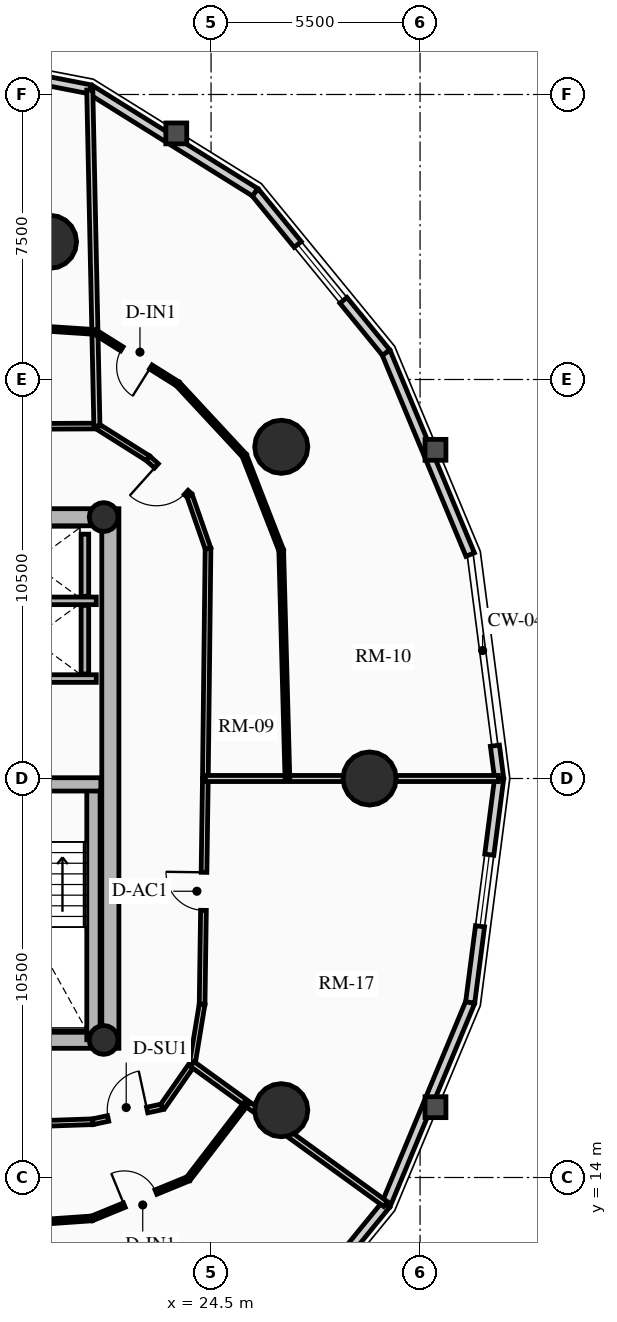
"""IFC4 building model, lengths in metres.
Left out: names, types, materials, properties, quantities, classifications, styles, units other than length and angle.
Written with IfcOpenShell. Run it as: python <this file> out.ifc"""

import sys

from ifc_helpers import new_model, si_unit, direction, frame, frame_2d, origin, origin_2d, place, context, subcontext, project, spatial, rectangle, circle, hollow_circle, extrude, source, transform, mapped, element, fill, save


model = new_model("IFC4")
c1 = context("Model", 3, precision=1e-05, world=origin(), true_north=direction((0.0, 1.0)))
c2 = subcontext(c1, "Body", "Model", "MODEL_VIEW")
j1 = project(units=[si_unit("LENGTHUNIT", "METRE"), si_unit("PLANEANGLEUNIT", "RADIAN")], contexts=[c1])
p1 = place(None, origin())
s1 = spatial("IfcSite", under=j1, at=p1, CompositionType="ELEMENT")
p2 = place(p1, origin())
s2 = spatial("IfcBuilding", under=s1, at=p2, CompositionType="ELEMENT")
p3 = place(p2, frame((0.0, 0.0, 87.61)))
s3 = spatial("IfcBuildingStorey", under=s2, at=p3, CompositionType="ELEMENT", Elevation=87.61)
p4 = place(p3, frame((21.85, 17.4, 0.0), z_axis=(0.0, 0.0, 1.0), x_axis=(0.0, 1.0, 0.0)))
e1 = element("IfcWall", 1, at=p4, inside=s3, PredefinedType="SHEAR", context=c2, shape_type="SweptSolid", body=[
    extrude(rectangle(XDim=14.2, YDim=0.45, at=frame_2d((7.1, 0.0))), origin(), (0.0, 0.0, 1.0), 2.91),
])
p5 = place(p3, frame((11.15, 17.625, 0.0), z_axis=(0.0, 0.0, 1.0), x_axis=(1.0, 0.0, 0.0)))
e2 = element("IfcWall", 2, at=p5, inside=s3, PredefinedType="SHEAR", context=c2, shape_type="SweptSolid", body=[
    extrude(rectangle(XDim=10.7, YDim=0.45, at=frame_2d((5.35, 0.0))), origin(), (0.0, 0.0, 1.0), 2.91),
])
m1 = source(origin(), c2, "Body", "SweptSolid", [
    extrude(rectangle(XDim=1.5, YDim=2.02, at=frame_2d((0.75, 1.01))), frame((0.0, 0.235, 0.0), z_axis=(0.0, -1.0, 0.0), x_axis=(1.0, 0.0, 0.0)), (0.0, 0.0, 1.0), 0.47),
])
p6 = place(p5, frame((5.45, 0.0, 0.0)))
e3 = element("IfcOpeningElement", 3, at=p6, cuts=e2, PredefinedType="OPENING", context=c2, shape_type="MappedRepresentation", body=[
    mapped(m1, transform((0.0, 0.0, 0.0), x_axis=(1.0, 0.0, 0.0), y_axis=(0.0, 1.0, 0.0), z_axis=(0.0, 0.0, 1.0), scale=1.0)),
])
p7 = place(p3, frame((11.15, 31.375, 0.0), z_axis=(0.0, 0.0, 1.0), x_axis=(1.0, 0.0, 0.0)))
e4 = element("IfcWall", 4, at=p7, inside=s3, PredefinedType="SHEAR", context=c2, shape_type="SweptSolid", body=[
    extrude(rectangle(XDim=10.7, YDim=0.45, at=frame_2d((5.35, 0.0))), origin(), (0.0, 0.0, 1.0), 2.91),
])
p8 = place(p7, frame((4.6, 0.0, 0.0)))
e5 = element("IfcOpeningElement", 5, at=p8, cuts=e4, PredefinedType="OPENING", context=c2, shape_type="MappedRepresentation", body=[
    mapped(m1, transform((0.0, 0.0, 0.0), x_axis=(1.0, 0.0, 0.0), y_axis=(0.0, 1.0, 0.0), z_axis=(0.0, 0.0, 1.0), scale=1.0)),
])
p9 = place(p3, frame((21.405, 17.625, 0.0), z_axis=(0.0, 0.0, 1.0), x_axis=(0.0, 1.0, 0.0)))
e6 = element("IfcWall", 6, at=p9, inside=s3, PredefinedType="SHEAR", context=c2, shape_type="SweptSolid", body=[
    extrude(rectangle(XDim=6.72, YDim=0.35, at=frame_2d((3.36, 0.0))), origin(), (0.0, 0.0, 1.0), 2.91),
])
p10 = place(p3, frame((18.315, 24.345, 0.0), z_axis=(0.0, 0.0, 1.0), x_axis=(1.0, 0.0, 0.0)))
e7 = element("IfcWall", 7, at=p10, inside=s3, PredefinedType="SHEAR", context=c2, shape_type="SweptSolid", body=[
    extrude(rectangle(XDim=3.285, YDim=0.35, at=frame_2d((1.643, 0.0))), origin(), (0.0, 0.0, 1.0), 2.91),
])
for number, where, z_axis, x_axis in (
    (8, (21.675, 17.62, 0.0), (0.0, 0.0, 1.0), (1.0, 0.0, 0.0)),
    (9, (21.675, 31.38, 0.0), (0.0, 0.0, 1.0), (1.0, 0.0, 0.0)),
):
    element("IfcColumn", number, at=place(p3, frame(where, z_axis=z_axis, x_axis=x_axis)), inside=s3, PredefinedType="COLUMN", context=c2, shape_type="SweptSolid", body=[
        extrude(hollow_circle(Radius=0.38, WallThickness=0.032, at=origin_2d()), origin(), (0.0, 0.0, 1.0), 2.91),
    ])
for number, where, z_axis, x_axis in (
    (10, (28.672, 24.5, 0.0), (0.0, 0.0, 1.0), (1.0, 0.0, 0.0)),
    (11, (26.347, 33.229, 0.0), (0.0, 0.0, 1.0), (1.0, 0.0, 0.0)),
    (12, (20.261, 38.623, 0.0), (0.0, 0.0, 1.0), (1.0, 0.0, 0.0)),
    (13, (26.347, 15.771, 0.0), (0.0, 0.0, 1.0), (1.0, 0.0, 0.0)),
):
    element("IfcColumn", number, at=place(p3, frame(where, z_axis=z_axis, x_axis=x_axis)), inside=s3, PredefinedType="USERDEFINED", context=c2, shape_type="SweptSolid", body=[
        extrude(circle(Radius=0.7, at=origin_2d()), origin(), (0.0, 0.0, 1.0), 2.91),
    ])
p11 = place(p3, frame((31.969, 25.363, 0.0), z_axis=(0.0, 0.0, 1.0), x_axis=(0.128523364007, -0.991706481225, 0.0)))
e14 = element("IfcWall", 14, at=p11, inside=s3, PredefinedType="SOLIDWALL", context=c2, shape_type="SweptSolid", body=[
    extrude(rectangle(XDim=0.87, YDim=0.24, at=frame_2d((0.435, 0.0))), origin(), (0.0, 0.0, 1.0), 2.655),
])
p12 = place(p3, frame((29.105, 35.709, 0.0), z_axis=(0.0, 0.0, 1.0), x_axis=(0.384344417632, -0.923189779317, 0.0)))
e15 = element("IfcWall", 15, at=p12, inside=s3, PredefinedType="SOLIDWALL", context=c2, shape_type="SweptSolid", body=[
    extrude(rectangle(XDim=5.758, YDim=0.24, at=frame_2d((2.879, 0.0))), origin(), (0.0, 0.0, 1.0), 2.179),
])
p13 = place(p3, frame((25.658, 39.928, 0.0), z_axis=(0.0, 0.0, 1.0), x_axis=(0.632700781152, -0.77439635945, 0.0)))
e16 = element("IfcWall", 16, at=p13, inside=s3, PredefinedType="SOLIDWALL", context=c2, shape_type="SweptSolid", body=[
    extrude(rectangle(XDim=5.448, YDim=0.24, at=frame_2d((2.724, 0.0))), origin(), (0.0, 0.0, 1.0), 2.179),
])
m2 = source(origin(), c2, "Body", "SweptSolid", [
    extrude(rectangle(XDim=1.9, YDim=1.35, at=frame_2d((0.95, 0.675))), frame((0.0, 0.13, 0.0), z_axis=(0.0, -1.0, 0.0), x_axis=(1.0, 0.0, 0.0)), (0.0, 0.0, 1.0), 0.26),
])
p14 = place(p13, frame((1.774, 0.0, 0.65)))
e17 = element("IfcOpeningElement", 17, at=p14, cuts=e16, PredefinedType="OPENING", context=c2, shape_type="MappedRepresentation", body=[
    mapped(m2, transform((0.0, 0.0, 0.0), x_axis=(1.0, 0.0, 0.0), y_axis=(0.0, 1.0, 0.0), z_axis=(0.0, 0.0, 1.0), scale=1.0)),
])
p15 = place(p3, frame((21.315, 42.637, 0.0), z_axis=(0.0, 0.0, 1.0), x_axis=(0.848520380187, -0.529162701263, 0.0)))
e18 = element("IfcWall", 18, at=p15, inside=s3, PredefinedType="SOLIDWALL", context=c2, shape_type="SweptSolid", body=[
    extrude(rectangle(XDim=5.119, YDim=0.24, at=frame_2d((2.56, 0.0))), origin(), (0.0, 0.0, 1.0), 2.179),
])
p16 = place(p3, frame((16.5, 43.57, 0.0), z_axis=(0.0, 0.0, 1.0), x_axis=(0.981723785992, -0.190311344954, 0.0)))
e19 = element("IfcWall", 19, at=p16, inside=s3, PredefinedType="SOLIDWALL", context=c2, shape_type="SweptSolid", body=[
    extrude(rectangle(XDim=4.904, YDim=0.24, at=frame_2d((2.452, 0.0))), origin(), (0.0, 0.0, 1.0), 2.179),
])
p17 = place(p16, frame((1.502, 0.0, 0.65)))
e20 = element("IfcOpeningElement", 20, at=p17, cuts=e19, PredefinedType="OPENING", context=c2, shape_type="MappedRepresentation", body=[
    mapped(m2, transform((0.0, 0.0, 0.0), x_axis=(1.0, 0.0, 0.0), y_axis=(0.0, 1.0, 0.0), z_axis=(0.0, 0.0, 1.0), scale=1.0)),
])
p18 = place(p3, frame((29.105, 13.291, 0.0), z_axis=(0.0, 0.0, 1.0), x_axis=(-0.632700781152, -0.77439635945, 0.0)))
e21 = element("IfcWall", 21, at=p18, inside=s3, PredefinedType="SOLIDWALL", context=c2, shape_type="SweptSolid", body=[
    extrude(rectangle(XDim=5.448, YDim=0.24, at=frame_2d((2.724, 0.0))), origin(), (0.0, 0.0, 1.0), 2.179),
])
p19 = place(p18, frame((1.774, 0.0, 0.65)))
e22 = element("IfcOpeningElement", 22, at=p19, cuts=e21, PredefinedType="OPENING", context=c2, shape_type="MappedRepresentation", body=[
    mapped(m2, transform((0.0, 0.0, 0.0), x_axis=(1.0, 0.0, 0.0), y_axis=(0.0, 1.0, 0.0), z_axis=(0.0, 0.0, 1.0), scale=1.0)),
])
p20 = place(p3, frame((31.318, 18.607, 0.0), z_axis=(0.0, 0.0, 1.0), x_axis=(-0.384344417632, -0.923189779317, 0.0)))
e23 = element("IfcWall", 23, at=p20, inside=s3, PredefinedType="SOLIDWALL", context=c2, shape_type="SweptSolid", body=[
    extrude(rectangle(XDim=5.758, YDim=0.24, at=frame_2d((2.879, 0.0))), origin(), (0.0, 0.0, 1.0), 2.179),
])
p21 = place(p3, frame((32.081, 24.5, 0.0), z_axis=(0.0, 0.0, 1.0), x_axis=(-0.128351991996, -0.991728675672, 0.0)))
e24 = element("IfcWall", 24, at=p21, inside=s3, PredefinedType="SOLIDWALL", context=c2, shape_type="SweptSolid", body=[
    extrude(rectangle(XDim=5.942, YDim=0.24, at=frame_2d((2.971, 0.0))), origin(), (0.0, 0.0, 1.0), 2.179),
])
p22 = place(p21, frame((2.021, 0.0, 0.65)))
e25 = element("IfcOpeningElement", 25, at=p22, cuts=e24, PredefinedType="OPENING", context=c2, shape_type="MappedRepresentation", body=[
    mapped(m2, transform((0.0, 0.0, 0.0), x_axis=(1.0, 0.0, 0.0), y_axis=(0.0, 1.0, 0.0), z_axis=(0.0, 0.0, 1.0), scale=1.0)),
])
for number, where, z_axis, x_axis in (
    (26, (18.51, 27.13, 0.0), (0.0, 0.0, 1.0), (1.0, 0.0, 0.0)),
    (27, (18.51, 29.175, 0.0), (0.0, 0.0, 1.0), (1.0, 0.0, 0.0)),
):
    element("IfcWall", number, at=place(p3, frame(where, z_axis=z_axis, x_axis=x_axis)), inside=s3, PredefinedType="SHEAR", context=c2, shape_type="SweptSolid", body=[
        extrude(rectangle(XDim=2.97, YDim=0.2, at=frame_2d((1.485, 0.0))), origin(), (0.0, 0.0, 1.0), 2.91),
    ])
p23 = place(p3, frame((21.18, 27.25, 0.0), z_axis=(0.0, 0.0, 1.0), x_axis=(0.0, 1.0, 0.0)))
e28 = element("IfcWall", 28, at=p23, inside=s3, PredefinedType="SHEAR", context=c2, shape_type="SweptSolid", body=[
    extrude(rectangle(XDim=1.805, YDim=0.2, at=frame_2d((0.902, 0.0))), origin(), (0.0, 0.0, 1.0), 2.91),
])
p24 = place(p3, frame((21.18, 29.295, 0.0), z_axis=(0.0, 0.0, 1.0), x_axis=(0.0, 1.0, 0.0)))
e29 = element("IfcWall", 29, at=p24, inside=s3, PredefinedType="SHEAR", context=c2, shape_type="SweptSolid", body=[
    extrude(rectangle(XDim=1.635, YDim=0.2, at=frame_2d((0.817, 0.0))), origin(), (0.0, 0.0, 1.0), 2.91),
])
p25 = place(p3, frame((24.35, 24.5, 0.0), z_axis=(0.0, 0.0, 1.0), x_axis=(0.011582078845, 0.999932925475, 0.0)))
e30 = element("IfcWall", 30, at=p25, inside=s3, PredefinedType="PARTITIONING", context=c2, shape_type="SweptSolid", body=[
    extrude(rectangle(XDim=6.05, YDim=0.15, at=frame_2d((3.025, 0.0))), origin(), (0.0, 0.0, 1.0), 2.225),
])
p26 = place(p3, frame((24.42, 30.549, 0.0), z_axis=(0.0, 0.0, 1.0), x_axis=(-0.329071042252, 0.944305167386, 0.0)))
e31 = element("IfcWall", 31, at=p26, inside=s3, PredefinedType="PARTITIONING", context=c2, shape_type="SweptSolid", body=[
    extrude(rectangle(XDim=1.479, YDim=0.15, at=frame_2d((0.74, 0.0))), origin(), (0.0, 0.0, 1.0), 2.225),
])
p27 = place(p3, frame((23.933, 31.946, 0.0), z_axis=(0.0, 0.0, 1.0), x_axis=(-0.744529651383, 0.667589393423, 0.0)))
e32 = element("IfcWall", 32, at=p27, inside=s3, PredefinedType="PARTITIONING", context=c2, shape_type="SweptSolid", body=[
    extrude(rectangle(XDim=1.472, YDim=0.15, at=frame_2d((0.736, 0.0))), origin(), (0.0, 0.0, 1.0), 2.225),
])
m3 = source(origin(), c2, "Body", "SweptSolid", [
    extrude(rectangle(XDim=1.05, YDim=2.015, at=frame_2d((0.525, 1.007))), frame((0.0, 0.085, 0.0), z_axis=(0.0, -1.0, 0.0), x_axis=(1.0, 0.0, 0.0)), (0.0, 0.0, 1.0), 0.17),
])
p28 = place(p27, frame((0.12, 0.0, 0.0)))
e33 = element("IfcOpeningElement", 33, at=p28, cuts=e32, PredefinedType="OPENING", context=c2, shape_type="MappedRepresentation", body=[
    mapped(m3, transform((0.0, 0.0, 0.0), x_axis=(1.0, 0.0, 0.0), y_axis=(0.0, 1.0, 0.0), z_axis=(0.0, 0.0, 1.0), scale=1.0)),
])
p29 = place(p3, frame((22.837, 32.929, 0.0), z_axis=(0.0, 0.0, 1.0), x_axis=(-0.84581079329, 0.533482991252, 0.0)))
e34 = element("IfcWall", 34, at=p29, inside=s3, PredefinedType="PARTITIONING", context=c2, shape_type="SweptSolid", body=[
    extrude(rectangle(XDim=1.585, YDim=0.15, at=frame_2d((0.792, 0.0))), origin(), (0.0, 0.0, 1.0), 2.225),
])
p30 = place(p3, frame((21.496, 33.775, 0.0), z_axis=(0.0, 0.0, 1.0), x_axis=(-0.999989544737, -0.004572790979, 0.0)))
e35 = element("IfcWall", 35, at=p30, inside=s3, PredefinedType="PARTITIONING", context=c2, shape_type="SweptSolid", body=[
    extrude(rectangle(XDim=3.364, YDim=0.15, at=frame_2d((1.682, 0.0))), origin(), (0.0, 0.0, 1.0), 2.225),
])
p31 = place(p3, frame((14.792, 15.24, 0.0), z_axis=(0.0, 0.0, 1.0), x_axis=(0.999408106202, 0.034401122909, 0.0)))
e36 = element("IfcWall", 36, at=p31, inside=s3, PredefinedType="PARTITIONING", context=c2, shape_type="SweptSolid", body=[
    extrude(rectangle(XDim=6.6, YDim=0.15, at=frame_2d((3.3, 0.0))), origin(), (0.0, 0.0, 1.0), 2.225),
])
p32 = place(p3, frame((21.388, 15.468, 0.0), z_axis=(0.0, 0.0, 1.0), x_axis=(0.977672748596, 0.210133283069, 0.0)))
e37 = element("IfcWall", 37, at=p32, inside=s3, PredefinedType="PARTITIONING", context=c2, shape_type="SweptSolid", body=[
    extrude(rectangle(XDim=1.876, YDim=0.15, at=frame_2d((0.938, 0.0))), origin(), (0.0, 0.0, 1.0), 2.225),
])
p33 = place(p32, frame((0.413, 0.0, 0.0)))
e38 = element("IfcOpeningElement", 38, at=p33, cuts=e37, PredefinedType="OPENING", context=c2, shape_type="MappedRepresentation", body=[
    mapped(m3, transform((0.0, 0.0, 0.0), x_axis=(1.0, 0.0, 0.0), y_axis=(0.0, 1.0, 0.0), z_axis=(0.0, 0.0, 1.0), scale=1.0)),
])
p34 = place(p3, frame((23.222, 15.862, 0.0), z_axis=(0.0, 0.0, 1.0), x_axis=(0.571941738195, 0.820294244836, 0.0)))
e39 = element("IfcWall", 39, at=p34, inside=s3, PredefinedType="PARTITIONING", context=c2, shape_type="SweptSolid", body=[
    extrude(rectangle(XDim=1.369, YDim=0.15, at=frame_2d((0.685, 0.0))), origin(), (0.0, 0.0, 1.0), 2.225),
])
p35 = place(p3, frame((24.006, 16.985, 0.0), z_axis=(0.0, 0.0, 1.0), x_axis=(0.162043475877, 0.986783619608, 0.0)))
e40 = element("IfcWall", 40, at=p35, inside=s3, PredefinedType="PARTITIONING", context=c2, shape_type="SweptSolid", body=[
    extrude(rectangle(XDim=1.597, YDim=0.15, at=frame_2d((0.798, 0.0))), origin(), (0.0, 0.0, 1.0), 2.225),
])
p36 = place(p3, frame((24.264, 18.561, 0.0), z_axis=(0.0, 0.0, 1.0), x_axis=(0.014427504204, 0.999895918145, 0.0)))
e41 = element("IfcWall", 41, at=p36, inside=s3, PredefinedType="PARTITIONING", context=c2, shape_type="SweptSolid", body=[
    extrude(rectangle(XDim=5.94, YDim=0.15, at=frame_2d((2.97, 0.0))), origin(), (0.0, 0.0, 1.0), 2.655),
])
m4 = source(origin(), c2, "Body", "SweptSolid", [
    extrude(rectangle(XDim=1.0, YDim=2.015, at=frame_2d((0.5, 1.007))), frame((0.0, 0.085, 0.0), z_axis=(0.0, -1.0, 0.0), x_axis=(1.0, 0.0, 0.0)), (0.0, 0.0, 1.0), 0.17),
])
p37 = place(p36, frame((2.47, 0.0, 0.0)))
e42 = element("IfcOpeningElement", 42, at=p37, cuts=e41, PredefinedType="OPENING", context=c2, shape_type="MappedRepresentation", body=[
    mapped(m4, transform((0.0, 0.0, 0.0), x_axis=(1.0, 0.0, 0.0), y_axis=(0.0, 1.0, 0.0), z_axis=(0.0, 0.0, 1.0), scale=1.0)),
])
p38 = place(p3, frame((24.35, 24.5, 0.0), z_axis=(0.0, 0.0, 1.0), x_axis=(1.0, 0.0, 0.0)))
e43 = element("IfcWall", 43, at=p38, inside=s3, PredefinedType="PARTITIONING", context=c2, shape_type="SweptSolid", body=[
    extrude(rectangle(XDim=7.711, YDim=0.16, at=frame_2d((3.855, 0.0))), origin(), (0.0, 0.0, 1.0), 2.179),
])
p39 = place(p3, frame((21.496, 33.775, 0.0), z_axis=(0.0, 0.0, 1.0), x_axis=(-0.021226580265, 0.999774690763, 0.0)))
e44 = element("IfcWall", 44, at=p39, inside=s3, PredefinedType="PARTITIONING", context=c2, shape_type="SweptSolid", body=[
    extrude(rectangle(XDim=8.845, YDim=0.16, at=frame_2d((4.422, 0.0))), origin(), (0.0, 0.0, 1.0), 2.179),
])
p40 = place(p3, frame((24.006, 16.985, 0.0), z_axis=(0.0, 0.0, 1.0), x_axis=(0.809849730791, -0.586637378231, 0.0)))
e45 = element("IfcWall", 45, at=p40, inside=s3, PredefinedType="PARTITIONING", context=c2, shape_type="SweptSolid", body=[
    extrude(rectangle(XDim=6.277, YDim=0.16, at=frame_2d((3.139, 0.0))), origin(), (0.0, 0.0, 1.0), 2.179),
])
p41 = place(p3, frame((26.509, 24.5, 0.0), z_axis=(0.0, 0.0, 1.0), x_axis=(-0.027112670792, 0.99963238397, 0.0)))
e46 = element("IfcWall", 46, at=p41, inside=s3, PredefinedType="PARTITIONING", context=c2, shape_type="SweptSolid", body=[
    extrude(rectangle(XDim=6.006, YDim=0.125, at=frame_2d((3.003, 0.0))), origin(), (0.0, 0.0, 1.0), 2.225),
])
p42 = place(p3, frame((26.346, 30.504, 0.0), z_axis=(0.0, 0.0, 1.0), x_axis=(-0.362402208915, 0.932021801769, 0.0)))
e47 = element("IfcWall", 47, at=p42, inside=s3, PredefinedType="PARTITIONING", context=c2, shape_type="SweptSolid", body=[
    extrude(rectangle(XDim=2.675, YDim=0.125, at=frame_2d((1.337, 0.0))), origin(), (0.0, 0.0, 1.0), 2.225),
])
p43 = place(p3, frame((25.377, 32.997, 0.0), z_axis=(0.0, 0.0, 1.0), x_axis=(-0.680516524321, 0.732732734445, 0.0)))
e48 = element("IfcWall", 48, at=p43, inside=s3, PredefinedType="PARTITIONING", context=c2, shape_type="SweptSolid", body=[
    extrude(rectangle(XDim=2.576, YDim=0.125, at=frame_2d((1.288, 0.0))), origin(), (0.0, 0.0, 1.0), 2.655),
])
p44 = place(p3, frame((23.624, 34.884, 0.0), z_axis=(0.0, 0.0, 1.0), x_axis=(-0.84728326465, 0.531141289531, 0.0)))
e49 = element("IfcWall", 49, at=p44, inside=s3, PredefinedType="PARTITIONING", context=c2, shape_type="SweptSolid", body=[
    extrude(rectangle(XDim=2.573, YDim=0.125, at=frame_2d((1.287, 0.0))), origin(), (0.0, 0.0, 1.0), 2.225),
])
m5 = source(origin(), c2, "Body", "SweptSolid", [
    extrude(rectangle(XDim=0.9, YDim=2.005, at=frame_2d((0.45, 1.002))), frame((0.0, 0.073, 0.0), z_axis=(0.0, -1.0, 0.0), x_axis=(1.0, 0.0, 0.0)), (0.0, 0.0, 1.0), 0.145),
])
p45 = place(p44, frame((0.836, 0.0, 0.0)))
e50 = element("IfcOpeningElement", 50, at=p45, cuts=e49, PredefinedType="OPENING", context=c2, shape_type="MappedRepresentation", body=[
    mapped(m5, transform((0.0, 0.0, 0.0), x_axis=(1.0, 0.0, 0.0), y_axis=(0.0, 1.0, 0.0), z_axis=(0.0, 0.0, 1.0), scale=1.0)),
])
p46 = place(p3, frame((21.444, 36.251, 0.0), z_axis=(0.0, 0.0, 1.0), x_axis=(-0.997810544349, 0.066137112017, 0.0)))
e51 = element("IfcWall", 51, at=p46, inside=s3, PredefinedType="PARTITIONING", context=c2, shape_type="SweptSolid", body=[
    extrude(rectangle(XDim=3.776, YDim=0.125, at=frame_2d((1.888, 0.0))), origin(), (0.0, 0.0, 1.0), 2.225),
])
p47 = place(p3, frame((15.27, 12.499, 0.0), z_axis=(0.0, 0.0, 1.0), x_axis=(0.997586055533, 0.069441067147, 0.0)))
e52 = element("IfcWall", 52, at=p47, inside=s3, PredefinedType="PARTITIONING", context=c2, shape_type="SweptSolid", body=[
    extrude(rectangle(XDim=6.11, YDim=0.125, at=frame_2d((3.055, 0.0))), origin(), (0.0, 0.0, 1.0), 2.225),
])
p48 = place(p3, frame((21.366, 12.924, 0.0), z_axis=(0.0, 0.0, 1.0), x_axis=(0.924996898971, 0.379974652962, 0.0)))
e53 = element("IfcWall", 53, at=p48, inside=s3, PredefinedType="PARTITIONING", context=c2, shape_type="SweptSolid", body=[
    extrude(rectangle(XDim=2.741, YDim=0.125, at=frame_2d((1.371, 0.0))), origin(), (0.0, 0.0, 1.0), 2.225),
])
p49 = place(p48, frame((0.92, 0.0, 0.0)))
e54 = element("IfcOpeningElement", 54, at=p49, cuts=e53, PredefinedType="OPENING", context=c2, shape_type="MappedRepresentation", body=[
    mapped(m5, transform((0.0, 0.0, 0.0), x_axis=(1.0, 0.0, 0.0), y_axis=(0.0, 1.0, 0.0), z_axis=(0.0, 0.0, 1.0), scale=1.0)),
])
p50 = place(p3, frame((23.901, 13.965, 0.0), z_axis=(0.0, 0.0, 1.0), x_axis=(0.609164923344, 0.793043565113, 0.0)))
e55 = element("IfcWall", 55, at=p50, inside=s3, PredefinedType="PARTITIONING", context=c2, shape_type="SweptSolid", body=[
    extrude(rectangle(XDim=2.508, YDim=0.125, at=frame_2d((1.254, 0.0))), origin(), (0.0, 0.0, 1.0), 2.655),
])
m6 = source(origin(), c2, "Body", "SweptSolid", [
    extrude(rectangle(XDim=1.9, YDim=1.35, at=frame_2d((0.95, 0.675))), frame((0.0, 0.03, 0.0), z_axis=(0.0, -1.0, 0.0), x_axis=(1.0, 0.0, 0.0)), (0.0, 0.0, 1.0), 0.06),
])
p51 = place(p14, origin())
e56 = element("IfcWindow", 56, at=p51, inside=s3, PartitioningType="DOUBLE_PANEL_VERTICAL", PredefinedType="WINDOW", context=c2, shape_type="MappedRepresentation", body=[
    mapped(m6, transform((0.0, 0.0, 0.0), x_axis=(1.0, 0.0, 0.0), y_axis=(0.0, 1.0, 0.0), z_axis=(0.0, 0.0, 1.0), scale=1.0)),
])
fill(e17, e56)
p52 = place(p22, origin())
e57 = element("IfcWindow", 57, at=p52, inside=s3, PartitioningType="DOUBLE_PANEL_VERTICAL", PredefinedType="WINDOW", context=c2, shape_type="MappedRepresentation", body=[
    mapped(m6, transform((0.0, 0.0, 0.0), x_axis=(1.0, 0.0, 0.0), y_axis=(0.0, 1.0, 0.0), z_axis=(0.0, 0.0, 1.0), scale=1.0)),
])
fill(e25, e57)
m7 = source(origin(), c2, "Body", "SweptSolid", [
    extrude(rectangle(XDim=1.05, YDim=2.015, at=frame_2d((0.525, 1.007))), frame((0.0, 0.025, 0.0), z_axis=(0.0, -1.0, 0.0), x_axis=(1.0, 0.0, 0.0)), (0.0, 0.0, 1.0), 0.05),
])
p53 = place(p28, origin())
e58 = element("IfcDoor", 58, at=p53, inside=s3, OperationType="SINGLE_SWING_RIGHT", PredefinedType="DOOR", context=c2, shape_type="MappedRepresentation", body=[
    mapped(m7, transform((0.0, 0.0, 0.0), x_axis=(1.0, 0.0, 0.0), y_axis=(0.0, 1.0, 0.0), z_axis=(0.0, 0.0, 1.0), scale=1.0)),
])
fill(e33, e58)
m8 = source(origin(), c2, "Body", "SweptSolid", [
    extrude(rectangle(XDim=0.9, YDim=2.005, at=frame_2d((0.45, 1.002))), frame((0.0, 0.025, 0.0), z_axis=(0.0, -1.0, 0.0), x_axis=(1.0, 0.0, 0.0)), (0.0, 0.0, 1.0), 0.05),
])
p54 = place(p45, origin())
e59 = element("IfcDoor", 59, at=p54, inside=s3, OperationType="SINGLE_SWING_LEFT", PredefinedType="DOOR", context=c2, shape_type="MappedRepresentation", body=[
    mapped(m8, transform((0.0, 0.0, 0.0), x_axis=(1.0, 0.0, 0.0), y_axis=(0.0, 1.0, 0.0), z_axis=(0.0, 0.0, 1.0), scale=1.0)),
])
fill(e50, e59)
p55 = place(p33, origin())
e60 = element("IfcDoor", 60, at=p55, inside=s3, OperationType="SINGLE_SWING_RIGHT", PredefinedType="DOOR", context=c2, shape_type="MappedRepresentation", body=[
    mapped(m7, transform((0.0, 0.0, 0.0), x_axis=(1.0, 0.0, 0.0), y_axis=(0.0, 1.0, 0.0), z_axis=(0.0, 0.0, 1.0), scale=1.0)),
])
fill(e38, e60)
p56 = place(p49, origin())
e61 = element("IfcDoor", 61, at=p56, inside=s3, OperationType="SINGLE_SWING_LEFT", PredefinedType="DOOR", context=c2, shape_type="MappedRepresentation", body=[
    mapped(m8, transform((0.0, 0.0, 0.0), x_axis=(1.0, 0.0, 0.0), y_axis=(0.0, 1.0, 0.0), z_axis=(0.0, 0.0, 1.0), scale=1.0)),
])
fill(e54, e61)
m9 = source(origin(), c2, "Body", "SweptSolid", [
    extrude(rectangle(XDim=1.0, YDim=2.015, at=frame_2d((0.5, 1.007))), frame((0.0, 0.025, 0.0), z_axis=(0.0, -1.0, 0.0), x_axis=(1.0, 0.0, 0.0)), (0.0, 0.0, 1.0), 0.05),
])
p57 = place(p37, origin())
e62 = element("IfcDoor", 62, at=p57, inside=s3, OperationType="SINGLE_SWING_RIGHT", PredefinedType="DOOR", context=c2, shape_type="MappedRepresentation", body=[
    mapped(m9, transform((0.0, 0.0, 0.0), x_axis=(1.0, 0.0, 0.0), y_axis=(0.0, 1.0, 0.0), z_axis=(0.0, 0.0, 1.0), scale=1.0)),
])
fill(e42, e62)
save(model, sys.argv[1])
